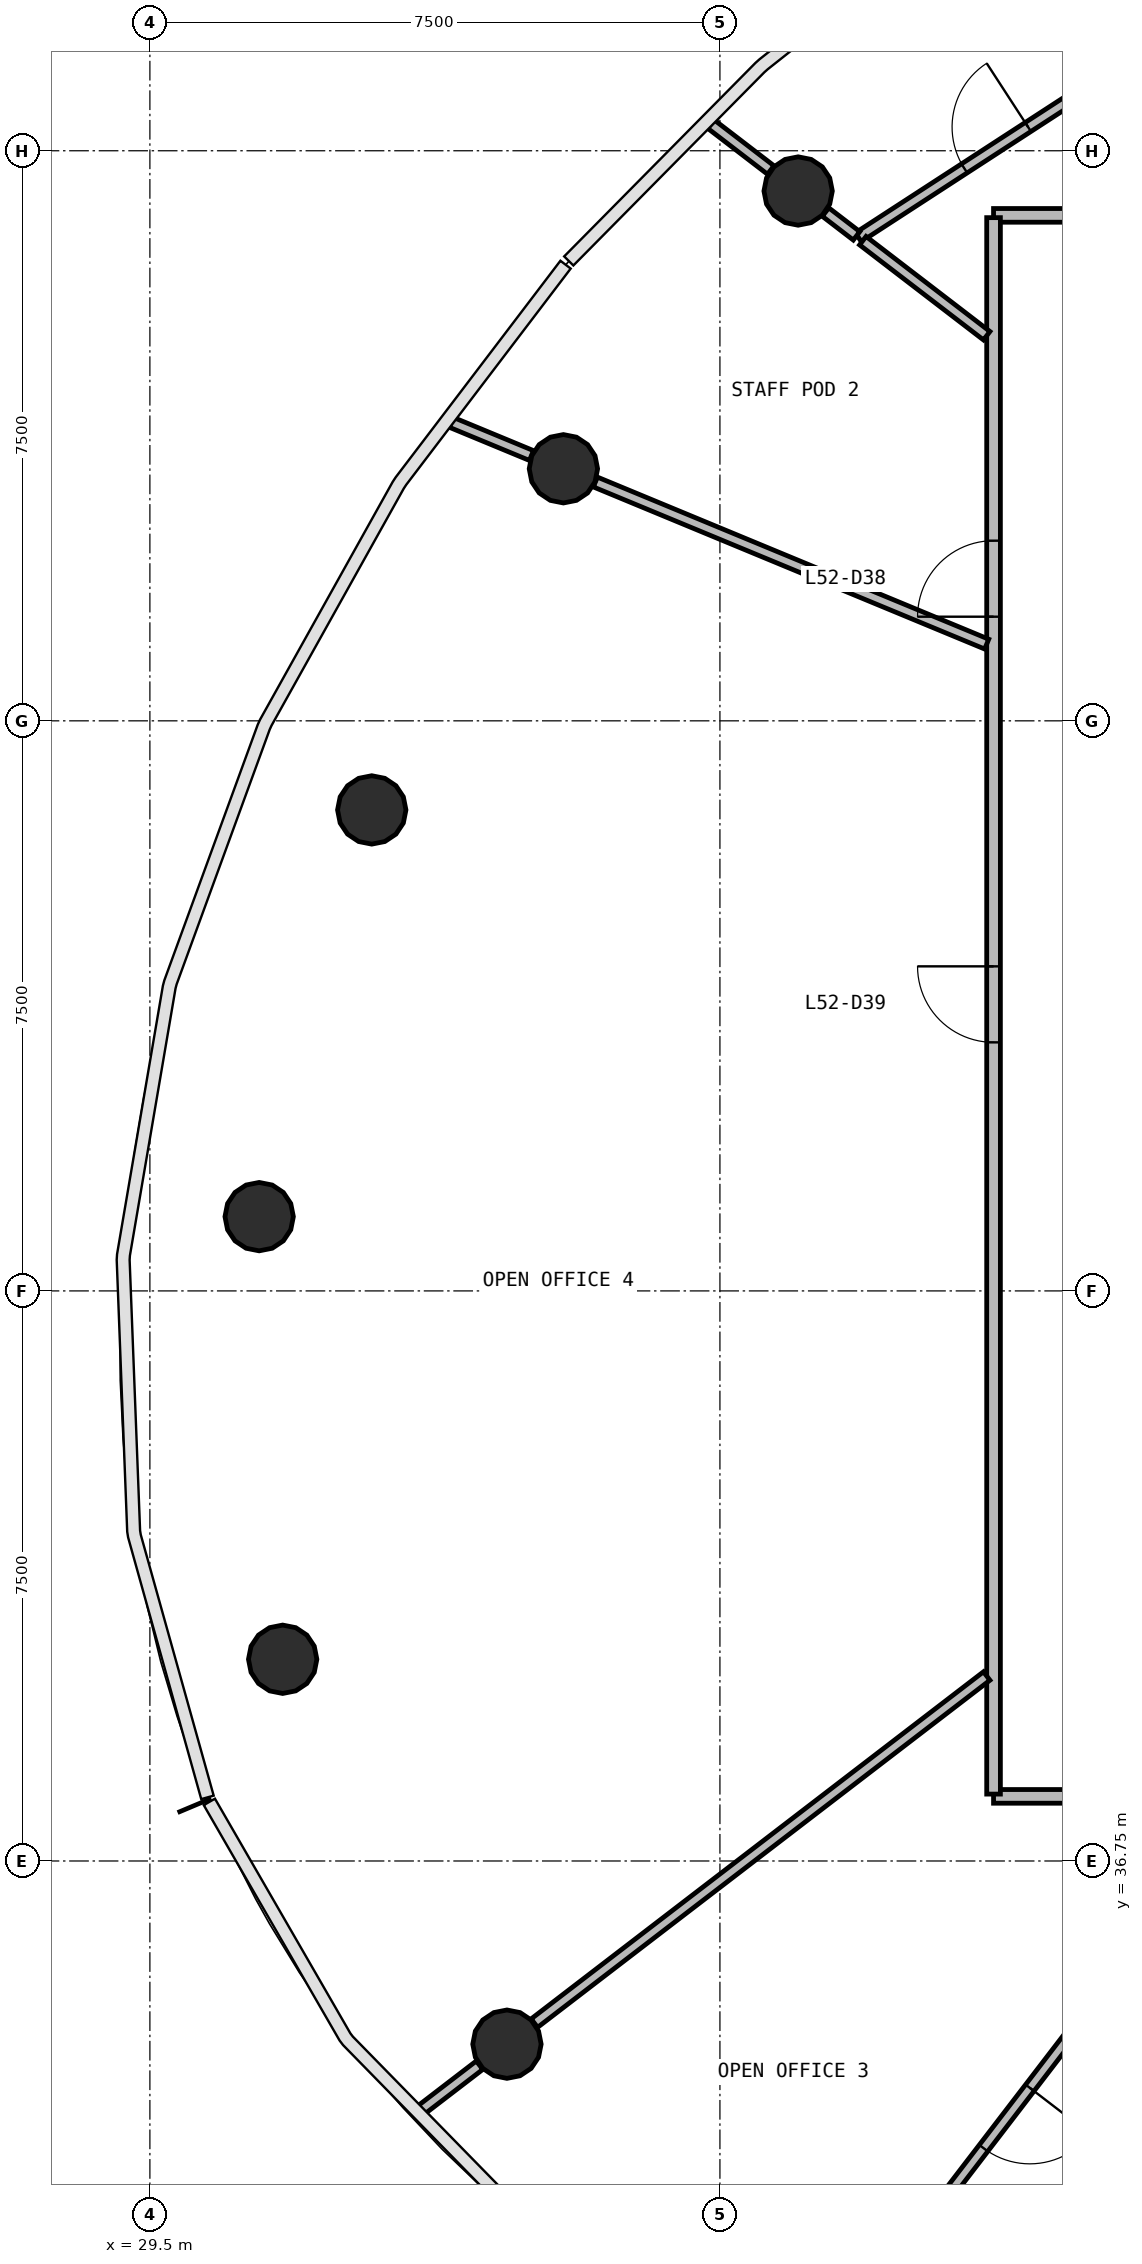
"""IFC4 building model, lengths in metres.
Left out: names, types, materials, properties, quantities, classifications, styles, units other than length and angle.
Written with IfcOpenShell. Run it as: python <this file> out.ifc"""

import sys

from ifc_helpers import new_model, si_unit, direction, frame, frame_2d, origin, origin_2d, place, context, subcontext, project, spatial, rectangle, circle, extrude, source, transform, mapped, element, fill, save


model = new_model("IFC4")
c1 = context("Model", 3, precision=1e-05, world=origin(), true_north=direction((0.0, 1.0)))
c2 = subcontext(c1, "Body", "Model", "MODEL_VIEW")
j1 = project(units=[si_unit("LENGTHUNIT", "METRE"), si_unit("PLANEANGLEUNIT", "RADIAN")], contexts=[c1])
p1 = place(None, origin())
s1 = spatial("IfcSite", under=j1, at=p1, CompositionType="ELEMENT")
p2 = place(p1, origin())
s2 = spatial("IfcBuilding", under=s1, at=p2, CompositionType="ELEMENT")
p3 = place(p2, frame((0.0, 0.0, 215.0)))
s3 = spatial("IfcBuildingStorey", under=s2, at=p3, CompositionType="ELEMENT", Elevation=215.0)
m1 = source(origin(), c2, "Body", "SweptSolid", [
    extrude(circle(Radius=0.45, at=origin_2d()), origin(), (0.0, 0.0, 1.0), 3.9),
])
for number, where, z_axis, x_axis in (
    (1, (38.029, 58.72, 0.0), (0.0, 0.0, 1.0), (1.0, 0.0, 0.0)),
    (2, (34.941, 55.066, 0.0), (0.0, 0.0, 1.0), (1.0, 0.0, 0.0)),
    (3, (32.419, 50.578, 0.0), (0.0, 0.0, 1.0), (1.0, 0.0, 0.0)),
    (4, (30.938, 45.227, 0.0), (0.0, 0.0, 1.0), (1.0, 0.0, 0.0)),
    (5, (31.247, 39.404, 0.0), (0.0, 0.0, 1.0), (1.0, 0.0, 0.0)),
    (6, (34.198, 34.34, 0.0), (0.0, 0.0, 1.0), (1.0, 0.0, 0.0)),
):
    element("IfcColumn", number, at=place(p3, frame(where, z_axis=z_axis, x_axis=x_axis)), inside=s3, PredefinedType="COLUMN", context=c2, shape_type="MappedRepresentation", body=[
        mapped(m1, transform((0.0, 0.0, 0.0), scale=1.0)),
    ])
p4 = place(p3, frame((40.6, 58.4, 0.0), z_axis=(0.0, 0.0, 1.0), x_axis=(1.0, 0.0, 0.0)))
e7 = element("IfcWall", 7, at=p4, inside=s3, PredefinedType="PARTITIONING", context=c2, shape_type="SweptSolid", body=[
    extrude(rectangle(XDim=22.8, YDim=0.18, at=frame_2d((11.4, 0.0))), origin(), (0.0, 0.0, 1.0), 2.88),
])
p5 = place(p4, frame((12.95, 0.0, 0.0)))
e8 = element("IfcOpeningElement", 8, at=p5, cuts=e7, PredefinedType="OPENING", context=c2, shape_type="SweptSolid", body=[
    extrude(rectangle(XDim=1.0, YDim=2.1, at=frame_2d((0.5, 1.05))), frame((0.0, 0.1, 0.0), z_axis=(0.0, -1.0, 0.0), x_axis=(1.0, 0.0, 0.0)), (0.0, 0.0, 1.0), 0.2),
])
p6 = place(p4, frame((10.95, 0.0, 0.0)))
e9 = element("IfcOpeningElement", 9, at=p6, cuts=e7, PredefinedType="OPENING", context=c2, shape_type="SweptSolid", body=[
    extrude(rectangle(XDim=1.0, YDim=2.1, at=frame_2d((0.5, 1.05))), frame((0.0, 0.1, 0.0), z_axis=(0.0, -1.0, 0.0), x_axis=(1.0, 0.0, 0.0)), (0.0, 0.0, 1.0), 0.2),
])
p7 = place(p3, frame((63.4, 37.6, 0.0), z_axis=(0.0, 0.0, 1.0), x_axis=(-1.0, 0.0, 0.0)))
e10 = element("IfcWall", 10, at=p7, inside=s3, PredefinedType="PARTITIONING", context=c2, shape_type="SweptSolid", body=[
    extrude(rectangle(XDim=22.8, YDim=0.18, at=frame_2d((11.4, 0.0))), origin(), (0.0, 0.0, 1.0), 2.88),
])
p8 = place(p7, frame((16.05, 0.0, 0.0)))
e11 = element("IfcOpeningElement", 11, at=p8, cuts=e10, PredefinedType="OPENING", context=c2, shape_type="SweptSolid", body=[
    extrude(rectangle(XDim=0.9, YDim=2.1, at=frame_2d((0.45, 1.05))), frame((0.0, 0.1, 0.0), z_axis=(0.0, -1.0, 0.0), x_axis=(1.0, 0.0, 0.0)), (0.0, 0.0, 1.0), 0.2),
])
p9 = place(p7, frame((13.05, 0.0, 0.0)))
e12 = element("IfcOpeningElement", 12, at=p9, cuts=e10, PredefinedType="OPENING", context=c2, shape_type="SweptSolid", body=[
    extrude(rectangle(XDim=0.9, YDim=2.1, at=frame_2d((0.45, 1.05))), frame((0.0, 0.1, 0.0), z_axis=(0.0, -1.0, 0.0), x_axis=(1.0, 0.0, 0.0)), (0.0, 0.0, 1.0), 0.2),
])
p10 = place(p7, frame((10.95, 0.0, 0.0)))
e13 = element("IfcOpeningElement", 13, at=p10, cuts=e10, PredefinedType="OPENING", context=c2, shape_type="SweptSolid", body=[
    extrude(rectangle(XDim=1.0, YDim=2.1, at=frame_2d((0.5, 1.05))), frame((0.0, 0.1, 0.0), z_axis=(0.0, -1.0, 0.0), x_axis=(1.0, 0.0, 0.0)), (0.0, 0.0, 1.0), 0.2),
])
p11 = place(p7, frame((19.95, 0.0, 0.0)))
e14 = element("IfcOpeningElement", 14, at=p11, cuts=e10, PredefinedType="OPENING", context=c2, shape_type="SweptSolid", body=[
    extrude(rectangle(XDim=1.0, YDim=2.1, at=frame_2d((0.5, 1.05))), frame((0.0, 0.1, 0.0), z_axis=(0.0, -1.0, 0.0), x_axis=(1.0, 0.0, 0.0)), (0.0, 0.0, 1.0), 0.2),
])
p12 = place(p3, frame((40.6, 37.63, 0.0), z_axis=(0.0, 0.0, 1.0), x_axis=(0.0, 1.0, 0.0)))
e15 = element("IfcWall", 15, at=p12, inside=s3, PredefinedType="PARTITIONING", context=c2, shape_type="SweptSolid", body=[
    extrude(rectangle(XDim=20.74, YDim=0.18, at=frame_2d((10.37, 0.0))), origin(), (0.0, 0.0, 1.0), 2.88),
])
p13 = place(p12, frame((15.49, 0.0, 0.0)))
e16 = element("IfcOpeningElement", 16, at=p13, cuts=e15, PredefinedType="OPENING", context=c2, shape_type="SweptSolid", body=[
    extrude(rectangle(XDim=1.0, YDim=2.1, at=frame_2d((0.5, 1.05))), frame((0.0, 0.1, 0.0), z_axis=(0.0, -1.0, 0.0), x_axis=(1.0, 0.0, 0.0)), (0.0, 0.0, 1.0), 0.2),
])
p14 = place(p12, frame((9.89, 0.0, 0.0)))
e17 = element("IfcOpeningElement", 17, at=p14, cuts=e15, PredefinedType="OPENING", context=c2, shape_type="SweptSolid", body=[
    extrude(rectangle(XDim=1.0, YDim=2.1, at=frame_2d((0.5, 1.05))), frame((0.0, 0.1, 0.0), z_axis=(0.0, -1.0, 0.0), x_axis=(1.0, 0.0, 0.0)), (0.0, 0.0, 1.0), 0.2),
])
p15 = place(p3, frame((40.51, 39.183, 0.0), z_axis=(0.0, 0.0, 1.0), x_axis=(-0.793355383425, -0.608758766336, 0.0)))
e18 = element("IfcWall", 18, at=p15, inside=s3, PredefinedType="PARTITIONING", context=c2, shape_type="SweptSolid", body=[
    extrude(rectangle(XDim=7.501, YDim=0.14, at=frame_2d((3.751, 0.0))), origin(), (0.0, 0.0, 1.0), 2.88),
])
p16 = place(p3, frame((40.51, 52.759, 0.0), z_axis=(0.0, 0.0, 1.0), x_axis=(-0.9238758778, 0.382692255499, 0.0)))
e19 = element("IfcWall", 19, at=p16, inside=s3, PredefinedType="PARTITIONING", context=c2, shape_type="SweptSolid", body=[
    extrude(rectangle(XDim=5.573, YDim=0.14, at=frame_2d((2.787, 0.0))), origin(), (0.0, 0.0, 1.0), 2.88),
])
p17 = place(p3, frame((42.082, 35.074, 0.0), z_axis=(0.0, 0.0, 1.0), x_axis=(-0.608752257704, -0.793360377596, 0.0)))
e20 = element("IfcWall", 20, at=p17, inside=s3, PredefinedType="PARTITIONING", context=c2, shape_type="SweptSolid", body=[
    extrude(rectangle(XDim=4.458, YDim=0.14, at=frame_2d((2.229, 0.0))), origin(), (0.0, 0.0, 1.0), 2.88),
])
p18 = place(p17, frame((1.65, 0.0, 0.0)))
e21 = element("IfcOpeningElement", 21, at=p18, cuts=e20, PredefinedType="OPENING", context=c2, shape_type="SweptSolid", body=[
    extrude(rectangle(XDim=1.0, YDim=2.1, at=frame_2d((0.5, 1.05))), frame((0.0, 0.08, 0.0), z_axis=(0.0, -1.0, 0.0), x_axis=(1.0, 0.0, 0.0)), (0.0, 0.0, 1.0), 0.16),
])
p19 = place(p3, frame((38.821, 58.112, 0.0), z_axis=(0.0, 0.0, 1.0), x_axis=(0.838669882541, 0.544640090444, 0.0)))
e22 = element("IfcWall", 22, at=p19, inside=s3, PredefinedType="PARTITIONING", context=c2, shape_type="SweptSolid", body=[
    extrude(rectangle(XDim=4.313, YDim=0.14, at=frame_2d((2.156, 0.0))), origin(), (0.0, 0.0, 1.0), 2.88),
])
p20 = place(p19, frame((1.663, 0.0, 0.0)))
e23 = element("IfcOpeningElement", 23, at=p20, cuts=e22, PredefinedType="OPENING", context=c2, shape_type="SweptSolid", body=[
    extrude(rectangle(XDim=1.0, YDim=2.1, at=frame_2d((0.5, 1.05))), frame((0.0, 0.08, 0.0), z_axis=(0.0, -1.0, 0.0), x_axis=(1.0, 0.0, 0.0)), (0.0, 0.0, 1.0), 0.16),
])
p21 = place(p3, frame((40.51, 56.817, 0.0), z_axis=(0.0, 0.0, 1.0), x_axis=(-0.793392079692, 0.608710939512, 0.0)))
e24 = element("IfcWall", 24, at=p21, inside=s3, PredefinedType="PARTITIONING", context=c2, shape_type="SweptSolid", body=[
    extrude(rectangle(XDim=2.054, YDim=0.14, at=frame_2d((1.027, 0.0))), origin(), (0.0, 0.0, 1.0), 2.88),
])
p22 = place(p3, frame((34.52, 55.24, 0.0), z_axis=(0.0, 0.0, 1.0), x_axis=(-0.92392296186, 0.38257856781, 0.0)))
e25 = element("IfcWall", 25, at=p22, inside=s3, PredefinedType="PARTITIONING", context=c2, shape_type="SweptSolid", body=[
    extrude(rectangle(XDim=1.141, YDim=0.14, at=frame_2d((0.571, 0.0))), origin(), (0.0, 0.0, 1.0), 2.88),
])
p23 = place(p3, frame((33.837, 34.063, 0.0), z_axis=(0.0, 0.0, 1.0), x_axis=(-0.793366099044, -0.608744801117, 0.0)))
e26 = element("IfcWall", 26, at=p23, inside=s3, PredefinedType="PARTITIONING", context=c2, shape_type="SweptSolid", body=[
    extrude(rectangle(XDim=1.014, YDim=0.14, at=frame_2d((0.507, 0.0))), origin(), (0.0, 0.0, 1.0), 2.88),
])
p24 = place(p3, frame((37.668, 58.997, 0.0), z_axis=(0.0, 0.0, 1.0), x_axis=(-0.793419984166, 0.608674567176, 0.0)))
e27 = element("IfcWall", 27, at=p24, inside=s3, PredefinedType="PARTITIONING", context=c2, shape_type="SweptSolid", body=[
    extrude(rectangle(XDim=0.991, YDim=0.14, at=frame_2d((0.496, 0.0))), origin(), (0.0, 0.0, 1.0), 2.88),
])
p25 = place(p3, frame((38.798, 58.131, 0.0), z_axis=(0.0, 0.0, 1.0), x_axis=(-0.793399979609, 0.608700642645, 0.0)))
e28 = element("IfcWall", 28, at=p25, inside=s3, PredefinedType="PARTITIONING", context=c2, shape_type="SweptSolid", body=[
    extrude(rectangle(XDim=0.514, YDim=0.14, at=frame_2d((0.257, 0.0))), origin(), (0.0, 0.0, 1.0), 2.88),
])
m2 = source(origin(), c2, "Body", "SweptSolid", [
    extrude(rectangle(XDim=1.0, YDim=2.1, at=frame_2d((0.5, 1.05))), frame((0.0, 0.025, 0.0), z_axis=(0.0, -1.0, 0.0), x_axis=(1.0, 0.0, 0.0)), (0.0, 0.0, 1.0), 0.05),
])
p26 = place(p18, origin())
e29 = element("IfcDoor", 29, at=p26, inside=s3, OperationType="SINGLE_SWING_LEFT", PredefinedType="DOOR", context=c2, shape_type="MappedRepresentation", body=[
    mapped(m2, transform((0.0, 0.0, 0.0), scale=1.0)),
])
fill(e21, e29)
p27 = place(p20, origin())
e30 = element("IfcDoor", 30, at=p27, inside=s3, OperationType="SINGLE_SWING_RIGHT", PredefinedType="DOOR", context=c2, shape_type="MappedRepresentation", body=[
    mapped(m2, transform((0.0, 0.0, 0.0), scale=1.0)),
])
fill(e23, e30)
p28 = place(p13, origin())
e31 = element("IfcDoor", 31, at=p28, inside=s3, OperationType="SINGLE_SWING_LEFT", PredefinedType="DOOR", context=c2, shape_type="MappedRepresentation", body=[
    mapped(m2, transform((0.0, 0.0, 0.0), scale=1.0)),
])
fill(e16, e31)
p29 = place(p14, origin())
e32 = element("IfcDoor", 32, at=p29, inside=s3, OperationType="SINGLE_SWING_RIGHT", PredefinedType="DOOR", context=c2, shape_type="MappedRepresentation", body=[
    mapped(m2, transform((0.0, 0.0, 0.0), scale=1.0)),
])
fill(e17, e32)
save(model, sys.argv[1])
